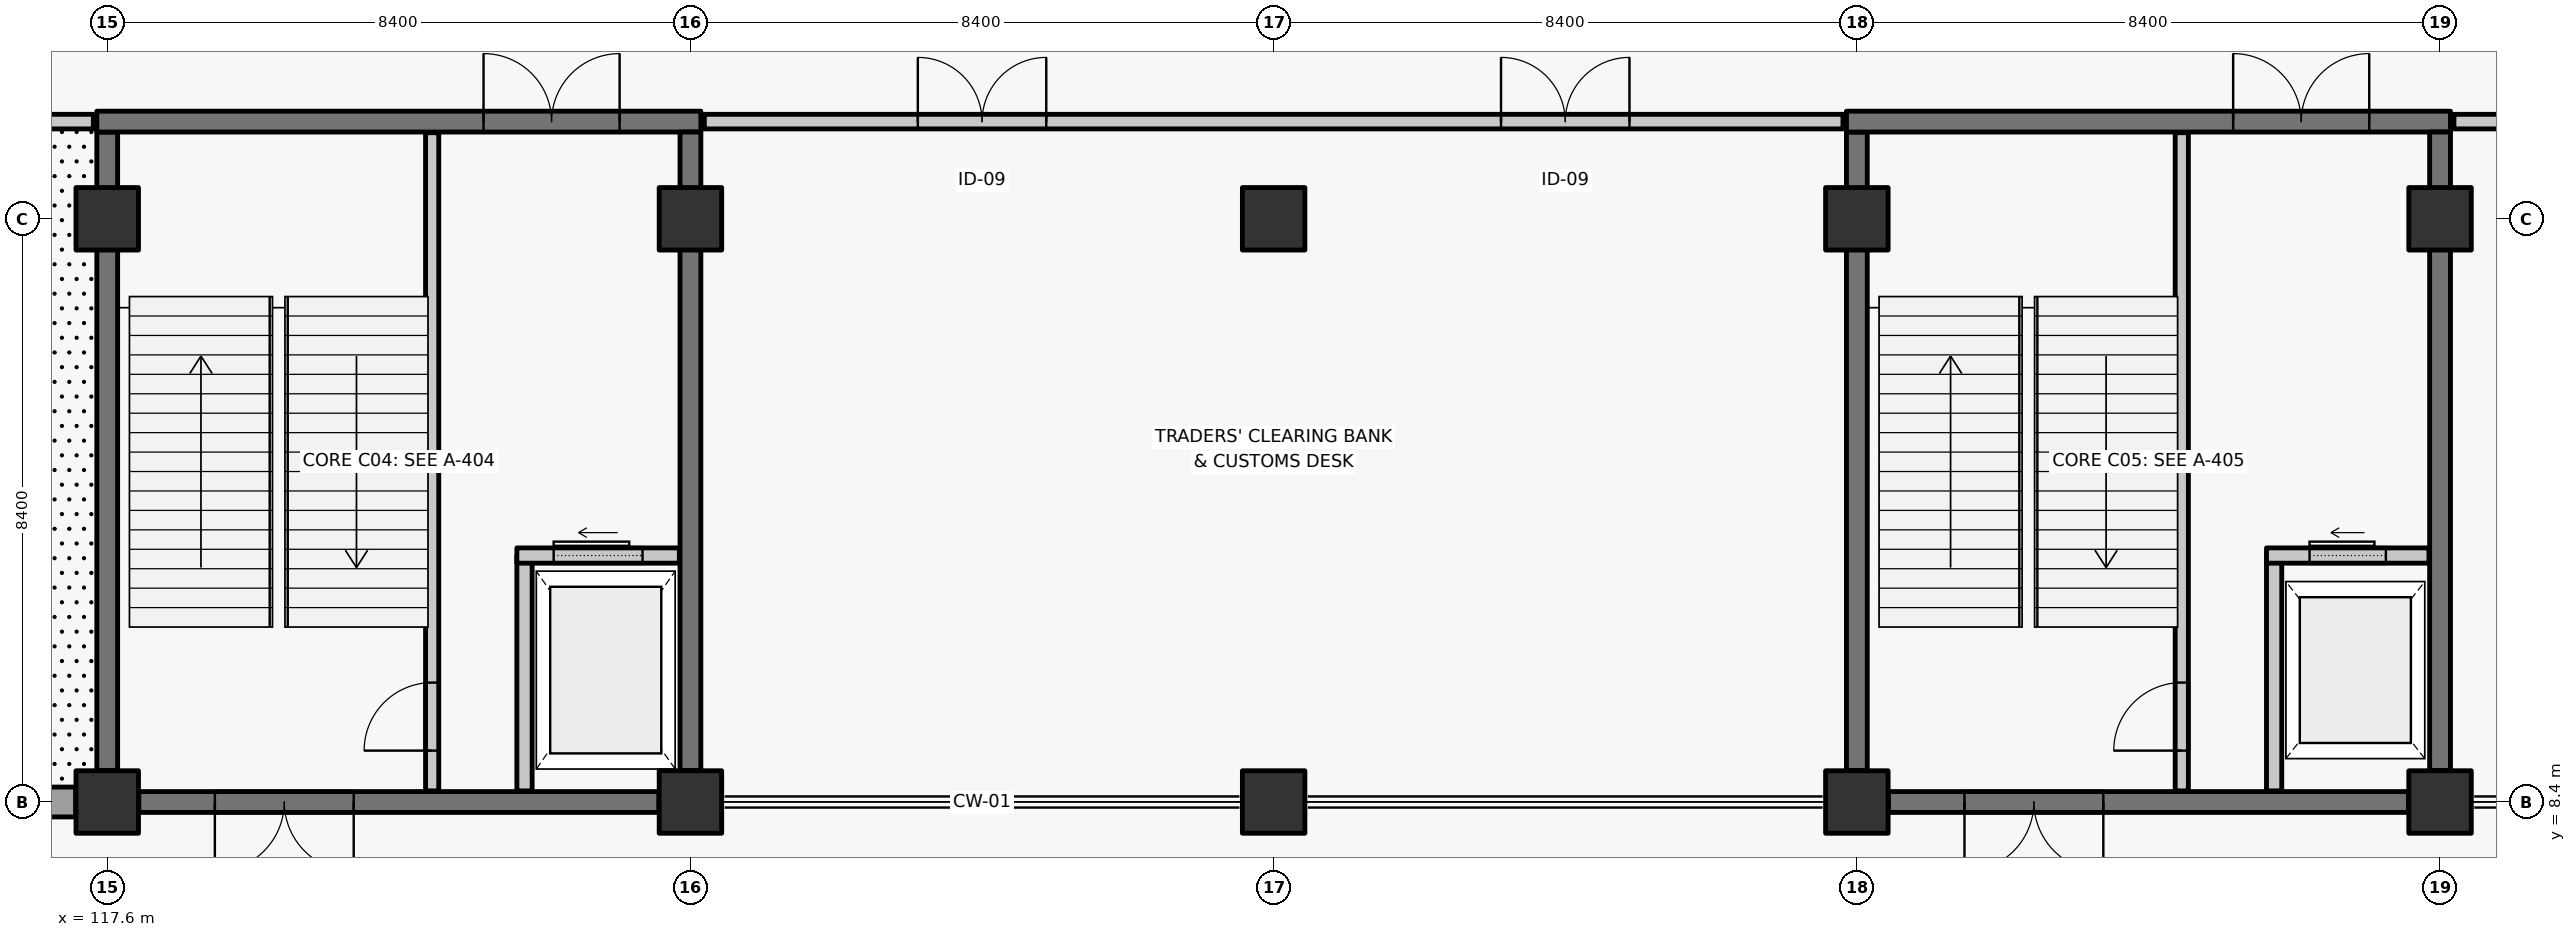
"""IFC4 building model, lengths in metres.
Left out: names, types, materials, properties, quantities, classifications, styles, units other than length and angle.
Written with IfcOpenShell. Run it as: python <this file> out.ifc"""

import sys

from ifc_helpers import new_model, si_unit, direction, frame, frame_2d, origin, origin_2d, place, context, subcontext, project, spatial, rectangle, extrude, element, fill, save


model = new_model("IFC4")
c1 = context("Model", 3, precision=1e-05, world=origin(), true_north=direction((0.0, 1.0)))
c2 = subcontext(c1, "Body", "Model", "MODEL_VIEW")
j1 = project(units=[si_unit("LENGTHUNIT", "METRE"), si_unit("PLANEANGLEUNIT", "RADIAN")], contexts=[c1])
p1 = place(None, origin())
s1 = spatial("IfcSite", under=j1, at=p1, CompositionType="ELEMENT")
p2 = place(p1, origin())
s2 = spatial("IfcBuilding", under=s1, at=p2, CompositionType="ELEMENT")
p3 = place(p2, origin())
s3 = spatial("IfcBuildingStorey", under=s2, at=p3, CompositionType="ELEMENT", Elevation=0.0)
for number, where, z_axis, x_axis in (
    (1, (117.6, 8.4, -0.36), (0.0, 0.0, 1.0), (1.0, 0.0, 0.0)),
    (2, (117.6, 16.8, -0.36), (0.0, 0.0, 1.0), (1.0, 0.0, 0.0)),
    (3, (126.0, 8.4, -0.36), (0.0, 0.0, 1.0), (1.0, 0.0, 0.0)),
    (4, (126.0, 16.8, -0.36), (0.0, 0.0, 1.0), (1.0, 0.0, 0.0)),
    (5, (134.4, 8.4, -0.36), (0.0, 0.0, 1.0), (1.0, 0.0, 0.0)),
    (6, (134.4, 16.8, -0.36), (0.0, 0.0, 1.0), (1.0, 0.0, 0.0)),
    (7, (142.8, 8.4, -0.36), (0.0, 0.0, 1.0), (1.0, 0.0, 0.0)),
    (8, (142.8, 16.8, -0.36), (0.0, 0.0, 1.0), (1.0, 0.0, 0.0)),
    (9, (151.2, 8.4, -0.36), (0.0, 0.0, 1.0), (1.0, 0.0, 0.0)),
    (10, (151.2, 16.8, -0.36), (0.0, 0.0, 1.0), (1.0, 0.0, 0.0)),
):
    element("IfcColumn", number, at=place(p3, frame(where, z_axis=z_axis, x_axis=x_axis)), inside=s3, PredefinedType="COLUMN", context=c2, shape_type="SweptSolid", body=[
        extrude(rectangle(XDim=0.9, YDim=0.9, at=origin_2d()), origin(), (0.0, 0.0, 1.0), 6.36),
    ])
p4 = place(p3, frame((117.145, 8.4, 0.0), z_axis=(0.0, 0.0, 1.0), x_axis=(-1.0, 0.0, 0.0)))
e11 = element("IfcWall", 11, at=p4, inside=s3, PredefinedType="SOLIDWALL", context=c2, shape_type="SweptSolid", body=[
    extrude(rectangle(XDim=7.49, YDim=0.43, at=frame_2d((3.745, 0.0))), origin(), (0.0, 0.0, 1.0), 5.13),
])
p5 = place(p4, frame((2.545, 0.0, 0.0)))
e12 = element("IfcOpeningElement", 12, at=p5, cuts=e11, PredefinedType="OPENING", context=c2, shape_type="SweptSolid", body=[
    extrude(rectangle(XDim=2.4, YDim=2.6, at=frame_2d((1.2, 1.3))), frame((0.0, 0.225, 0.0), z_axis=(0.0, -1.0, 0.0), x_axis=(1.0, 0.0, 0.0)), (0.0, 0.0, 1.0), 0.45),
])
p6 = place(p3, frame((125.545, 8.4, -0.36), z_axis=(0.0, 0.0, 1.0), x_axis=(-1.0, 0.0, 0.0)))
e13 = element("IfcWall", 13, at=p6, inside=s3, PredefinedType="SHEAR", context=c2, shape_type="SweptSolid", body=[
    extrude(rectangle(XDim=7.49, YDim=0.3, at=frame_2d((3.745, 0.0))), origin(), (0.0, 0.0, 1.0), 6.08),
])
p7 = place(p6, frame((4.395, 0.0, 0.36)))
e14 = element("IfcOpeningElement", 14, at=p7, cuts=e13, PredefinedType="OPENING", context=c2, shape_type="SweptSolid", body=[
    extrude(rectangle(XDim=2.0, YDim=2.28, at=frame_2d((1.0, 1.14))), frame((0.0, 0.16, 0.0), z_axis=(0.0, -1.0, 0.0), x_axis=(1.0, 0.0, 0.0)), (0.0, 0.0, 1.0), 0.32),
])
p8 = place(p3, frame((117.6, 8.855, -0.36), z_axis=(0.0, 0.0, 1.0), x_axis=(0.0, 1.0, 0.0)))
e15 = element("IfcWall", 15, at=p8, inside=s3, PredefinedType="SHEAR", context=c2, shape_type="SweptSolid", body=[
    extrude(rectangle(XDim=9.195, YDim=0.3, at=frame_2d((4.598, 0.0))), origin(), (0.0, 0.0, 1.0), 6.08),
])
p9 = place(p3, frame((117.45, 18.2, -0.36), z_axis=(0.0, 0.0, 1.0), x_axis=(1.0, 0.0, 0.0)))
e16 = element("IfcWall", 16, at=p9, inside=s3, PredefinedType="SHEAR", context=c2, shape_type="SweptSolid", body=[
    extrude(rectangle(XDim=8.7, YDim=0.3, at=frame_2d((4.35, 0.0))), origin(), (0.0, 0.0, 1.0), 6.08),
])
p10 = place(p9, frame((5.57, 0.0, 0.36)))
e17 = element("IfcOpeningElement", 17, at=p10, cuts=e16, PredefinedType="OPENING", context=c2, shape_type="SweptSolid", body=[
    extrude(rectangle(XDim=1.96, YDim=2.2, at=frame_2d((0.98, 1.1))), frame((0.0, 0.16, 0.0), z_axis=(0.0, -1.0, 0.0), x_axis=(1.0, 0.0, 0.0)), (0.0, 0.0, 1.0), 0.32),
])
p11 = place(p3, frame((126.0, 18.05, -0.36), z_axis=(0.0, 0.0, 1.0), x_axis=(0.0, -1.0, 0.0)))
e18 = element("IfcWall", 18, at=p11, inside=s3, PredefinedType="SHEAR", context=c2, shape_type="SweptSolid", body=[
    extrude(rectangle(XDim=9.195, YDim=0.3, at=frame_2d((4.598, 0.0))), origin(), (0.0, 0.0, 1.0), 6.08),
])
p12 = place(p3, frame((122.28, 8.56, -0.36), z_axis=(0.0, 0.0, 1.0), x_axis=(0.0, 1.0, 0.0)))
e19 = element("IfcWall", 19, at=p12, inside=s3, PredefinedType="SOLIDWALL", context=c2, shape_type="SweptSolid", body=[
    extrude(rectangle(XDim=9.48, YDim=0.19, at=frame_2d((4.74, 0.0))), origin(), (0.0, 0.0, 1.0), 6.08),
])
p13 = place(p12, frame((0.58, 0.0, 0.36)))
e20 = element("IfcOpeningElement", 20, at=p13, cuts=e19, PredefinedType="OPENING", context=c2, shape_type="SweptSolid", body=[
    extrude(rectangle(XDim=0.98, YDim=2.15, at=frame_2d((0.49, 1.075))), frame((0.0, 0.105, 0.0), z_axis=(0.0, -1.0, 0.0), x_axis=(1.0, 0.0, 0.0)), (0.0, 0.0, 1.0), 0.21),
])
p14 = place(p3, frame((123.61, 8.56, 0.0), z_axis=(0.0, 0.0, 1.0), x_axis=(0.0, 1.0, 0.0)))
e21 = element("IfcWall", 21, at=p14, inside=s3, PredefinedType="SOLIDWALL", context=c2, shape_type="SweptSolid", body=[
    extrude(rectangle(XDim=3.39, YDim=0.22, at=frame_2d((1.695, 0.0))), origin(), (0.0, 0.0, 1.0), 5.72),
])
p15 = place(p3, frame((123.5, 11.95, 0.0), z_axis=(0.0, 0.0, 1.0), x_axis=(1.0, 0.0, 0.0)))
e22 = element("IfcWall", 22, at=p15, inside=s3, PredefinedType="SOLIDWALL", context=c2, shape_type="SweptSolid", body=[
    extrude(rectangle(XDim=2.34, YDim=0.22, at=frame_2d((1.17, 0.0))), origin(), (0.0, 0.0, 1.0), 5.72),
])
p16 = place(p15, frame((0.53, 0.0, 0.0)))
e23 = element("IfcOpeningElement", 23, at=p16, cuts=e22, PredefinedType="OPENING", context=c2, shape_type="SweptSolid", body=[
    extrude(rectangle(XDim=1.28, YDim=2.25, at=frame_2d((0.64, 1.125))), frame((0.0, 0.12, 0.0), z_axis=(0.0, -1.0, 0.0), x_axis=(1.0, 0.0, 0.0)), (0.0, 0.0, 1.0), 0.24),
])
p17 = place(p3, frame((150.745, 8.4, -0.36), z_axis=(0.0, 0.0, 1.0), x_axis=(-1.0, 0.0, 0.0)))
e24 = element("IfcWall", 24, at=p17, inside=s3, PredefinedType="SHEAR", context=c2, shape_type="SweptSolid", body=[
    extrude(rectangle(XDim=7.49, YDim=0.3, at=frame_2d((3.745, 0.0))), origin(), (0.0, 0.0, 1.0), 6.08),
])
p18 = place(p17, frame((4.395, 0.0, 0.36)))
e25 = element("IfcOpeningElement", 25, at=p18, cuts=e24, PredefinedType="OPENING", context=c2, shape_type="SweptSolid", body=[
    extrude(rectangle(XDim=2.0, YDim=2.28, at=frame_2d((1.0, 1.14))), frame((0.0, 0.16, 0.0), z_axis=(0.0, -1.0, 0.0), x_axis=(1.0, 0.0, 0.0)), (0.0, 0.0, 1.0), 0.32),
])
p19 = place(p3, frame((142.8, 8.855, -0.36), z_axis=(0.0, 0.0, 1.0), x_axis=(0.0, 1.0, 0.0)))
e26 = element("IfcWall", 26, at=p19, inside=s3, PredefinedType="SHEAR", context=c2, shape_type="SweptSolid", body=[
    extrude(rectangle(XDim=9.195, YDim=0.3, at=frame_2d((4.598, 0.0))), origin(), (0.0, 0.0, 1.0), 6.08),
])
p20 = place(p3, frame((142.65, 18.2, -0.36), z_axis=(0.0, 0.0, 1.0), x_axis=(1.0, 0.0, 0.0)))
e27 = element("IfcWall", 27, at=p20, inside=s3, PredefinedType="SHEAR", context=c2, shape_type="SweptSolid", body=[
    extrude(rectangle(XDim=8.7, YDim=0.3, at=frame_2d((4.35, 0.0))), origin(), (0.0, 0.0, 1.0), 6.08),
])
p21 = place(p20, frame((5.57, 0.0, 0.36)))
e28 = element("IfcOpeningElement", 28, at=p21, cuts=e27, PredefinedType="OPENING", context=c2, shape_type="SweptSolid", body=[
    extrude(rectangle(XDim=1.96, YDim=2.2, at=frame_2d((0.98, 1.1))), frame((0.0, 0.16, 0.0), z_axis=(0.0, -1.0, 0.0), x_axis=(1.0, 0.0, 0.0)), (0.0, 0.0, 1.0), 0.32),
])
p22 = place(p3, frame((151.2, 18.05, -0.36), z_axis=(0.0, 0.0, 1.0), x_axis=(0.0, -1.0, 0.0)))
e29 = element("IfcWall", 29, at=p22, inside=s3, PredefinedType="SHEAR", context=c2, shape_type="SweptSolid", body=[
    extrude(rectangle(XDim=9.195, YDim=0.3, at=frame_2d((4.598, 0.0))), origin(), (0.0, 0.0, 1.0), 6.08),
])
p23 = place(p3, frame((147.48, 8.56, -0.36), z_axis=(0.0, 0.0, 1.0), x_axis=(0.0, 1.0, 0.0)))
e30 = element("IfcWall", 30, at=p23, inside=s3, PredefinedType="SOLIDWALL", context=c2, shape_type="SweptSolid", body=[
    extrude(rectangle(XDim=9.48, YDim=0.19, at=frame_2d((4.74, 0.0))), origin(), (0.0, 0.0, 1.0), 6.08),
])
p24 = place(p23, frame((0.58, 0.0, 0.36)))
e31 = element("IfcOpeningElement", 31, at=p24, cuts=e30, PredefinedType="OPENING", context=c2, shape_type="SweptSolid", body=[
    extrude(rectangle(XDim=0.98, YDim=2.15, at=frame_2d((0.49, 1.075))), frame((0.0, 0.105, 0.0), z_axis=(0.0, -1.0, 0.0), x_axis=(1.0, 0.0, 0.0)), (0.0, 0.0, 1.0), 0.21),
])
p25 = place(p3, frame((148.81, 8.56, 0.0), z_axis=(0.0, 0.0, 1.0), x_axis=(0.0, 1.0, 0.0)))
e32 = element("IfcWall", 32, at=p25, inside=s3, PredefinedType="SOLIDWALL", context=c2, shape_type="SweptSolid", body=[
    extrude(rectangle(XDim=3.39, YDim=0.22, at=frame_2d((1.695, 0.0))), origin(), (0.0, 0.0, 1.0), 5.72),
])
p26 = place(p3, frame((148.7, 11.95, 0.0), z_axis=(0.0, 0.0, 1.0), x_axis=(1.0, 0.0, 0.0)))
e33 = element("IfcWall", 33, at=p26, inside=s3, PredefinedType="SOLIDWALL", context=c2, shape_type="SweptSolid", body=[
    extrude(rectangle(XDim=2.34, YDim=0.22, at=frame_2d((1.17, 0.0))), origin(), (0.0, 0.0, 1.0), 5.72),
])
p27 = place(p26, frame((0.62, 0.0, 0.0)))
e34 = element("IfcOpeningElement", 34, at=p27, cuts=e33, PredefinedType="OPENING", context=c2, shape_type="SweptSolid", body=[
    extrude(rectangle(XDim=1.1, YDim=2.2, at=frame_2d((0.55, 1.1))), frame((0.0, 0.12, 0.0), z_axis=(0.0, -1.0, 0.0), x_axis=(1.0, 0.0, 0.0)), (0.0, 0.0, 1.0), 0.24),
])
p28 = place(p3, frame((101.0, 18.2, 0.0), z_axis=(0.0, 0.0, 1.0), x_axis=(1.0, 0.0, 0.0)))
e35 = element("IfcWall", 35, at=p28, inside=s3, PredefinedType="PARTITIONING", context=c2, shape_type="SweptSolid", body=[
    extrude(rectangle(XDim=16.4, YDim=0.21, at=frame_2d((8.2, 0.0))), origin(), (0.0, 0.0, 1.0), 5.72),
])
p29 = place(p28, frame((3.075, 0.0, 0.0)))
e36 = element("IfcOpeningElement", 36, at=p29, cuts=e35, PredefinedType="OPENING", context=c2, shape_type="SweptSolid", body=[
    extrude(rectangle(XDim=1.85, YDim=2.25, at=frame_2d((0.925, 1.125))), frame((0.0, 0.115, 0.0), z_axis=(0.0, -1.0, 0.0), x_axis=(1.0, 0.0, 0.0)), (0.0, 0.0, 1.0), 0.23),
])
p30 = place(p28, frame((11.475, 0.0, 0.0)))
e37 = element("IfcOpeningElement", 37, at=p30, cuts=e35, PredefinedType="OPENING", context=c2, shape_type="SweptSolid", body=[
    extrude(rectangle(XDim=1.85, YDim=2.25, at=frame_2d((0.925, 1.125))), frame((0.0, 0.115, 0.0), z_axis=(0.0, -1.0, 0.0), x_axis=(1.0, 0.0, 0.0)), (0.0, 0.0, 1.0), 0.23),
])
p31 = place(p3, frame((126.2, 18.2, 0.0), z_axis=(0.0, 0.0, 1.0), x_axis=(1.0, 0.0, 0.0)))
e38 = element("IfcWall", 38, at=p31, inside=s3, PredefinedType="PARTITIONING", context=c2, shape_type="SweptSolid", body=[
    extrude(rectangle(XDim=16.4, YDim=0.21, at=frame_2d((8.2, 0.0))), origin(), (0.0, 0.0, 1.0), 5.72),
])
p32 = place(p31, frame((3.075, 0.0, 0.0)))
e39 = element("IfcOpeningElement", 39, at=p32, cuts=e38, PredefinedType="OPENING", context=c2, shape_type="SweptSolid", body=[
    extrude(rectangle(XDim=1.85, YDim=2.25, at=frame_2d((0.925, 1.125))), frame((0.0, 0.115, 0.0), z_axis=(0.0, -1.0, 0.0), x_axis=(1.0, 0.0, 0.0)), (0.0, 0.0, 1.0), 0.23),
])
p33 = place(p31, frame((11.475, 0.0, 0.0)))
e40 = element("IfcOpeningElement", 40, at=p33, cuts=e38, PredefinedType="OPENING", context=c2, shape_type="SweptSolid", body=[
    extrude(rectangle(XDim=1.85, YDim=2.25, at=frame_2d((0.925, 1.125))), frame((0.0, 0.115, 0.0), z_axis=(0.0, -1.0, 0.0), x_axis=(1.0, 0.0, 0.0)), (0.0, 0.0, 1.0), 0.23),
])
p34 = place(p3, frame((151.4, 18.2, 0.0), z_axis=(0.0, 0.0, 1.0), x_axis=(1.0, 0.0, 0.0)))
e41 = element("IfcWall", 41, at=p34, inside=s3, PredefinedType="PARTITIONING", context=c2, shape_type="SweptSolid", body=[
    extrude(rectangle(XDim=33.2, YDim=0.21, at=frame_2d((16.6, 0.0))), origin(), (0.0, 0.0, 1.0), 5.72),
])
p35 = place(p34, frame((3.41, 0.0, 0.0)))
e42 = element("IfcOpeningElement", 42, at=p35, cuts=e41, PredefinedType="OPENING", context=c2, shape_type="SweptSolid", body=[
    extrude(rectangle(XDim=1.18, YDim=2.16, at=frame_2d((0.59, 1.08))), frame((0.0, 0.115, 0.0), z_axis=(0.0, -1.0, 0.0), x_axis=(1.0, 0.0, 0.0)), (0.0, 0.0, 1.0), 0.23),
])
p36 = place(p34, frame((28.61, 0.0, 0.0)))
e43 = element("IfcOpeningElement", 43, at=p36, cuts=e41, PredefinedType="OPENING", context=c2, shape_type="SweptSolid", body=[
    extrude(rectangle(XDim=1.18, YDim=2.16, at=frame_2d((0.59, 1.08))), frame((0.0, 0.115, 0.0), z_axis=(0.0, -1.0, 0.0), x_axis=(1.0, 0.0, 0.0)), (0.0, 0.0, 1.0), 0.23),
])
p37 = place(p13, origin())
e44 = element("IfcDoor", 44, at=p37, inside=s3, OperationType="SINGLE_SWING_LEFT", PredefinedType="DOOR", context=c2, shape_type="SweptSolid", body=[
    extrude(rectangle(XDim=0.98, YDim=2.15, at=frame_2d((0.49, 1.075))), frame((0.0, 0.025, 0.0), z_axis=(0.0, -1.0, 0.0), x_axis=(1.0, 0.0, 0.0)), (0.0, 0.0, 1.0), 0.05),
])
fill(e20, e44)
p38 = place(p10, origin())
e45 = element("IfcDoor", 45, at=p38, inside=s3, OperationType="DOUBLE_DOOR_SINGLE_SWING", PredefinedType="DOOR", context=c2, shape_type="SweptSolid", body=[
    extrude(rectangle(XDim=1.96, YDim=2.2, at=frame_2d((0.98, 1.1))), frame((0.0, 0.025, 0.0), z_axis=(0.0, -1.0, 0.0), x_axis=(1.0, 0.0, 0.0)), (0.0, 0.0, 1.0), 0.05),
])
fill(e17, e45)
p39 = place(p7, origin())
e46 = element("IfcDoor", 46, at=p39, inside=s3, OperationType="DOUBLE_DOOR_SINGLE_SWING", PredefinedType="DOOR", context=c2, shape_type="SweptSolid", body=[
    extrude(rectangle(XDim=2.0, YDim=2.28, at=frame_2d((1.0, 1.14))), frame((0.0, 0.025, 0.0), z_axis=(0.0, -1.0, 0.0), x_axis=(1.0, 0.0, 0.0)), (0.0, 0.0, 1.0), 0.05),
])
fill(e14, e46)
p40 = place(p16, origin())
e47 = element("IfcDoor", 47, at=p40, inside=s3, OperationType="SLIDING_TO_LEFT", PredefinedType="DOOR", context=c2, shape_type="SweptSolid", body=[
    extrude(rectangle(XDim=1.28, YDim=2.25, at=frame_2d((0.64, 1.125))), frame((0.0, 0.025, 0.0), z_axis=(0.0, -1.0, 0.0), x_axis=(1.0, 0.0, 0.0)), (0.0, 0.0, 1.0), 0.05),
])
fill(e23, e47)
p41 = place(p24, origin())
e48 = element("IfcDoor", 48, at=p41, inside=s3, OperationType="SINGLE_SWING_LEFT", PredefinedType="DOOR", context=c2, shape_type="SweptSolid", body=[
    extrude(rectangle(XDim=0.98, YDim=2.15, at=frame_2d((0.49, 1.075))), frame((0.0, 0.025, 0.0), z_axis=(0.0, -1.0, 0.0), x_axis=(1.0, 0.0, 0.0)), (0.0, 0.0, 1.0), 0.05),
])
fill(e31, e48)
p42 = place(p21, origin())
e49 = element("IfcDoor", 49, at=p42, inside=s3, OperationType="DOUBLE_DOOR_SINGLE_SWING", PredefinedType="DOOR", context=c2, shape_type="SweptSolid", body=[
    extrude(rectangle(XDim=1.96, YDim=2.2, at=frame_2d((0.98, 1.1))), frame((0.0, 0.025, 0.0), z_axis=(0.0, -1.0, 0.0), x_axis=(1.0, 0.0, 0.0)), (0.0, 0.0, 1.0), 0.05),
])
fill(e28, e49)
p43 = place(p18, origin())
e50 = element("IfcDoor", 50, at=p43, inside=s3, OperationType="DOUBLE_DOOR_SINGLE_SWING", PredefinedType="DOOR", context=c2, shape_type="SweptSolid", body=[
    extrude(rectangle(XDim=2.0, YDim=2.28, at=frame_2d((1.0, 1.14))), frame((0.0, 0.025, 0.0), z_axis=(0.0, -1.0, 0.0), x_axis=(1.0, 0.0, 0.0)), (0.0, 0.0, 1.0), 0.05),
])
fill(e25, e50)
p44 = place(p27, origin())
e51 = element("IfcDoor", 51, at=p44, inside=s3, OperationType="SLIDING_TO_LEFT", PredefinedType="DOOR", context=c2, shape_type="SweptSolid", body=[
    extrude(rectangle(XDim=1.1, YDim=2.2, at=frame_2d((0.55, 1.1))), frame((0.0, 0.025, 0.0), z_axis=(0.0, -1.0, 0.0), x_axis=(1.0, 0.0, 0.0)), (0.0, 0.0, 1.0), 0.05),
])
fill(e34, e51)
p45 = place(p32, origin())
e52 = element("IfcDoor", 52, at=p45, inside=s3, OperationType="DOUBLE_DOOR_SINGLE_SWING", PredefinedType="DOOR", context=c2, shape_type="SweptSolid", body=[
    extrude(rectangle(XDim=1.85, YDim=2.25, at=frame_2d((0.925, 1.125))), frame((0.0, 0.025, 0.0), z_axis=(0.0, -1.0, 0.0), x_axis=(1.0, 0.0, 0.0)), (0.0, 0.0, 1.0), 0.05),
])
fill(e39, e52)
p46 = place(p33, origin())
e53 = element("IfcDoor", 53, at=p46, inside=s3, OperationType="DOUBLE_DOOR_SINGLE_SWING", PredefinedType="DOOR", context=c2, shape_type="SweptSolid", body=[
    extrude(rectangle(XDim=1.85, YDim=2.25, at=frame_2d((0.925, 1.125))), frame((0.0, 0.025, 0.0), z_axis=(0.0, -1.0, 0.0), x_axis=(1.0, 0.0, 0.0)), (0.0, 0.0, 1.0), 0.05),
])
fill(e40, e53)
save(model, sys.argv[1])
